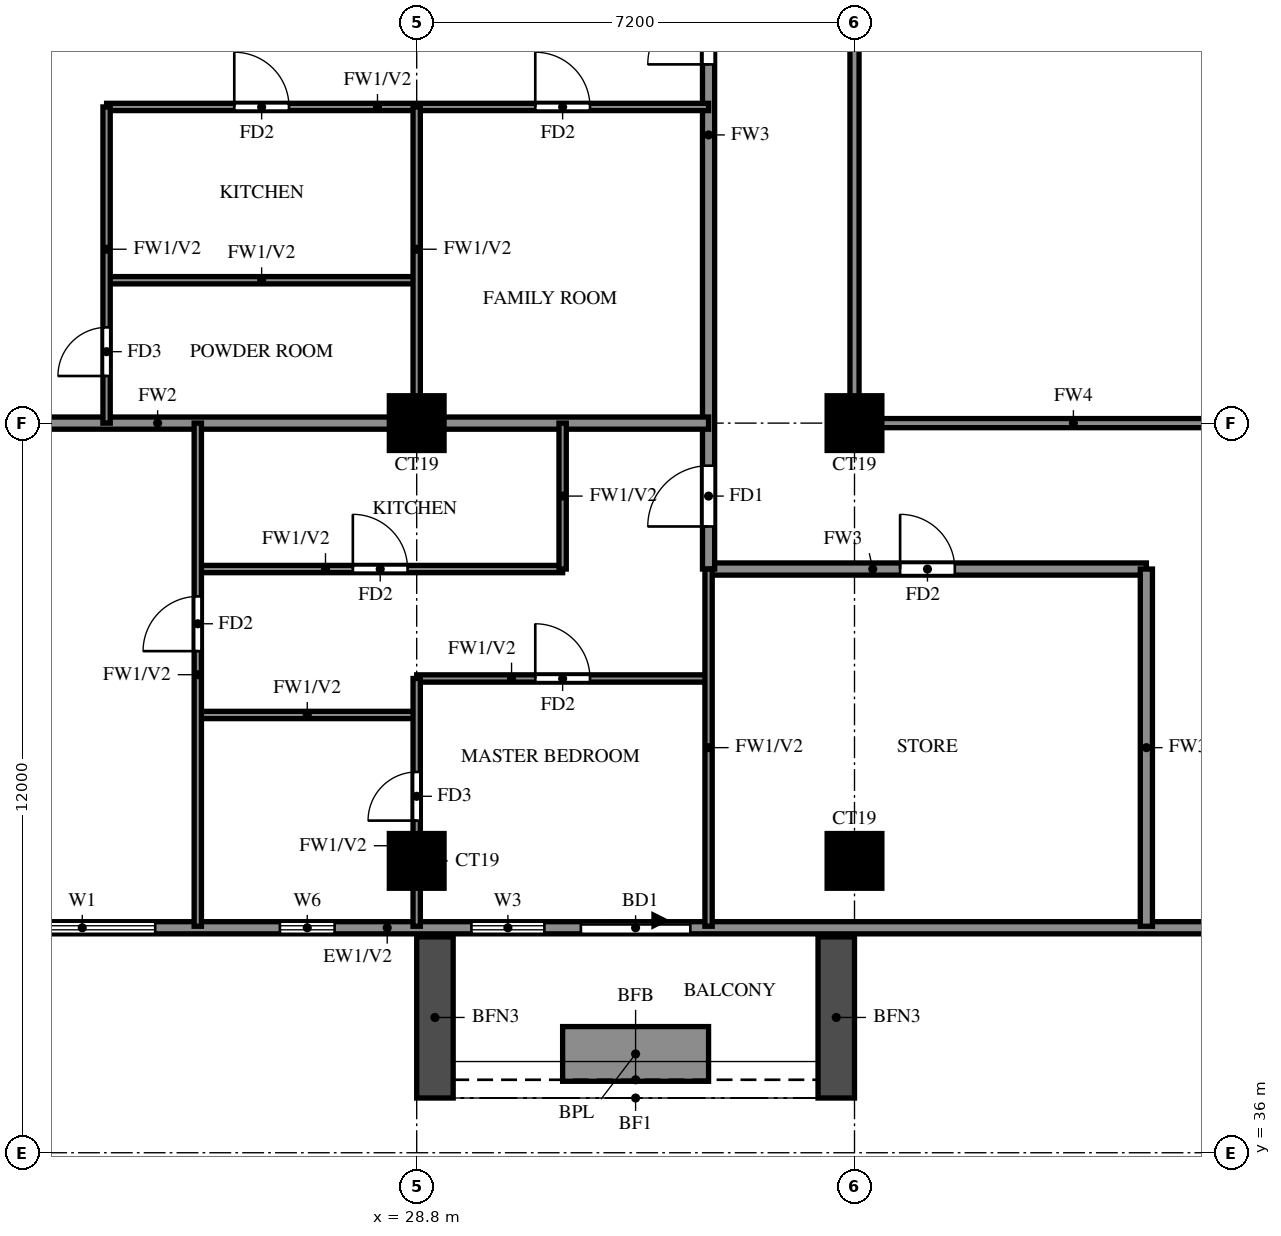
"""IFC4 building model, lengths in metres.
Left out: names, types, materials, properties, quantities, classifications, styles, units other than length and angle.
Written with IfcOpenShell. Run it as: python <this file> out.ifc"""

import sys

from ifc_helpers import new_model, si_unit, direction, frame, frame_2d, origin, origin_2d, place, context, subcontext, project, spatial, rectangle, extrude, source, transform, mapped, element, fill, save


model = new_model("IFC4")
c1 = context("Model", 3, precision=1e-05, world=origin(), true_north=direction((0.0, 1.0)))
c2 = subcontext(c1, "Body", "Model", "MODEL_VIEW")
j1 = project(units=[si_unit("LENGTHUNIT", "METRE"), si_unit("PLANEANGLEUNIT", "RADIAN")], contexts=[c1])
p1 = place(None, origin())
s1 = spatial("IfcSite", under=j1, at=p1, CompositionType="ELEMENT")
p2 = place(p1, origin())
s2 = spatial("IfcBuilding", under=s1, at=p2, CompositionType="ELEMENT")
p3 = place(p2, frame((0.0, 0.0, 199.0)))
s3 = spatial("IfcBuildingStorey", under=s2, at=p3, CompositionType="ELEMENT", Elevation=199.0)
m1 = source(origin(), c2, "Body", "SweptSolid", [
    extrude(rectangle(XDim=0.9, YDim=0.9, at=origin_2d()), origin(), (0.0, 0.0, 1.0), 3.2),
])
for number, where, z_axis, x_axis in (
    (1, (28.8, 40.8, 0.0), (0.0, 0.0, 1.0), (1.0, 0.0, 0.0)),
    (2, (36.0, 40.8, 0.0), (0.0, 0.0, 1.0), (1.0, 0.0, 0.0)),
    (3, (28.8, 48.0, 0.0), (0.0, 0.0, 1.0), (1.0, 0.0, 0.0)),
    (4, (36.0, 48.0, 0.0), (0.0, 0.0, 1.0), (1.0, 0.0, 0.0)),
):
    element("IfcColumn", number, at=place(p3, frame(where, z_axis=z_axis, x_axis=x_axis)), inside=s3, PredefinedType="COLUMN", context=c2, shape_type="MappedRepresentation", body=[
        mapped(m1, transform((0.0, 0.0, 0.0))),
    ])
p4 = place(p3, frame((18.2, 39.7, 0.0), z_axis=(0.0, 0.0, 1.0), x_axis=(1.0, 0.0, 0.0)))
e5 = element("IfcWall", 5, at=p4, inside=s3, PredefinedType="SOLIDWALL", context=c2, shape_type="SweptSolid", body=[
    extrude(rectangle(XDim=23.8, YDim=0.2, at=frame_2d((11.9, 0.0))), origin(), (0.0, 0.0, 1.0), 3.2),
])
p5 = place(p4, frame((13.3, 0.0, 0.0)))
e6 = element("IfcOpeningElement", 6, at=p5, cuts=e5, PredefinedType="OPENING", context=c2, shape_type="SweptSolid", body=[
    extrude(rectangle(XDim=1.8, YDim=2.4, at=frame_2d((0.9, 1.2))), frame((0.0, 0.11, 0.0), z_axis=(0.0, -1.0, 0.0), x_axis=(1.0, 0.0, 0.0)), (0.0, 0.0, 1.0), 0.22),
])
p6 = place(p4, frame((0.9, 0.0, 0.6)))
e7 = element("IfcOpeningElement", 7, at=p6, cuts=e5, PredefinedType="OPENING", context=c2, shape_type="SweptSolid", body=[
    extrude(rectangle(XDim=2.4, YDim=2.4, at=frame_2d((1.2, 1.2))), frame((0.0, 0.11, 0.0), z_axis=(0.0, -1.0, 0.0), x_axis=(1.0, 0.0, 0.0)), (0.0, 0.0, 1.0), 0.22),
])
p7 = place(p4, frame((3.9, 0.0, 0.6)))
e8 = element("IfcOpeningElement", 8, at=p7, cuts=e5, PredefinedType="OPENING", context=c2, shape_type="SweptSolid", body=[
    extrude(rectangle(XDim=2.4, YDim=2.4, at=frame_2d((1.2, 1.2))), frame((0.0, 0.11, 0.0), z_axis=(0.0, -1.0, 0.0), x_axis=(1.0, 0.0, 0.0)), (0.0, 0.0, 1.0), 0.22),
])
p8 = place(p4, frame((11.5, 0.0, 0.6)))
e9 = element("IfcOpeningElement", 9, at=p8, cuts=e5, PredefinedType="OPENING", context=c2, shape_type="SweptSolid", body=[
    extrude(rectangle(XDim=1.2, YDim=2.4, at=frame_2d((0.6, 1.2))), frame((0.0, 0.11, 0.0), z_axis=(0.0, -1.0, 0.0), x_axis=(1.0, 0.0, 0.0)), (0.0, 0.0, 1.0), 0.22),
])
p9 = place(p4, frame((8.35, 0.0, 1.5)))
e10 = element("IfcOpeningElement", 10, at=p9, cuts=e5, PredefinedType="OPENING", context=c2, shape_type="SweptSolid", body=[
    extrude(rectangle(XDim=0.9, YDim=0.9, at=frame_2d((0.45, 0.45))), frame((0.0, 0.11, 0.0), z_axis=(0.0, -1.0, 0.0), x_axis=(1.0, 0.0, 0.0)), (0.0, 0.0, 1.0), 0.22),
])
for number, where, z_axis, x_axis in (
    (11, (29.1, 39.55, 0.0), (0.0, 0.0, 1.0), (0.0, -1.0, 0.0)),
    (12, (35.7, 39.55, 0.0), (0.0, 0.0, 1.0), (0.0, -1.0, 0.0)),
):
    element("IfcWall", number, at=place(p3, frame(where, z_axis=z_axis, x_axis=x_axis)), inside=s3, PredefinedType="SOLIDWALL", context=c2, shape_type="SweptSolid", body=[
        extrude(rectangle(XDim=2.65, YDim=0.6, at=frame_2d((1.325, 0.0))), origin(), (0.0, 0.0, 1.0), 2.85),
    ])
p10 = place(p3, frame((31.2, 37.625, 0.0), z_axis=(0.0, 0.0, 1.0), x_axis=(1.0, 0.0, 0.0)))
e13 = element("IfcWall", 13, at=p10, inside=s3, PredefinedType="SOLIDWALL", context=c2, shape_type="SweptSolid", body=[
    extrude(rectangle(XDim=2.4, YDim=0.9, at=frame_2d((1.2, 0.0))), origin(), (0.0, 0.0, 1.0), 0.9),
])
p11 = place(p3, frame((33.6, 45.6, 0.0), z_axis=(0.0, 0.0, 1.0), x_axis=(1.0, 0.0, 0.0)))
e14 = element("IfcWall", 14, at=p11, inside=s3, PredefinedType="SOLIDWALL", context=c2, shape_type="SweptSolid", body=[
    extrude(rectangle(XDim=7.2, YDim=0.2, at=frame_2d((3.6, 0.0))), origin(), (0.0, 0.0, 1.0), 3.2),
])
p12 = place(p11, frame((3.15, 0.0, 0.0)))
e15 = element("IfcOpeningElement", 15, at=p12, cuts=e14, PredefinedType="OPENING", context=c2, shape_type="SweptSolid", body=[
    extrude(rectangle(XDim=0.9, YDim=2.1, at=frame_2d((0.45, 1.05))), frame((0.0, 0.11, 0.0), z_axis=(0.0, -1.0, 0.0), x_axis=(1.0, 0.0, 0.0)), (0.0, 0.0, 1.0), 0.22),
])
p13 = place(p3, frame((33.6, 45.6, 0.0), z_axis=(0.0, 0.0, 1.0), x_axis=(0.0, 1.0, 0.0)))
e16 = element("IfcWall", 16, at=p13, inside=s3, PredefinedType="SOLIDWALL", context=c2, shape_type="SweptSolid", body=[
    extrude(rectangle(XDim=16.8, YDim=0.2, at=frame_2d((8.4, 0.0))), origin(), (0.0, 0.0, 1.0), 3.2),
])
p14 = place(p13, frame((0.7, 0.0, 0.0)))
e17 = element("IfcOpeningElement", 17, at=p14, cuts=e16, PredefinedType="OPENING", context=c2, shape_type="SweptSolid", body=[
    extrude(rectangle(XDim=1.0, YDim=2.1, at=frame_2d((0.5, 1.05))), frame((0.0, 0.11, 0.0), z_axis=(0.0, -1.0, 0.0), x_axis=(1.0, 0.0, 0.0)), (0.0, 0.0, 1.0), 0.22),
])
p15 = place(p13, frame((8.3, 0.0, 0.0)))
e18 = element("IfcOpeningElement", 18, at=p15, cuts=e16, PredefinedType="OPENING", context=c2, shape_type="SweptSolid", body=[
    extrude(rectangle(XDim=1.0, YDim=2.1, at=frame_2d((0.5, 1.05))), frame((0.0, 0.11, 0.0), z_axis=(0.0, -1.0, 0.0), x_axis=(1.0, 0.0, 0.0)), (0.0, 0.0, 1.0), 0.22),
])
p16 = place(p13, frame((15.1, 0.0, 0.0)))
e19 = element("IfcOpeningElement", 19, at=p16, cuts=e16, PredefinedType="OPENING", context=c2, shape_type="SweptSolid", body=[
    extrude(rectangle(XDim=1.0, YDim=2.1, at=frame_2d((0.5, 1.05))), frame((0.0, 0.11, 0.0), z_axis=(0.0, -1.0, 0.0), x_axis=(1.0, 0.0, 0.0)), (0.0, 0.0, 1.0), 0.22),
])
p17 = place(p3, frame((40.8, 39.725, 0.0), z_axis=(0.0, 0.0, 1.0), x_axis=(0.0, 1.0, 0.0)))
e20 = element("IfcWall", 20, at=p17, inside=s3, PredefinedType="SOLIDWALL", context=c2, shape_type="SweptSolid", body=[
    extrude(rectangle(XDim=5.875, YDim=0.2, at=frame_2d((2.938, 0.0))), origin(), (0.0, 0.0, 1.0), 3.2),
])
p18 = place(p3, frame((14.525, 48.0, 0.0), z_axis=(0.0, 0.0, 1.0), x_axis=(1.0, 0.0, 0.0)))
e21 = element("IfcWall", 21, at=p18, inside=s3, PredefinedType="SOLIDWALL", context=c2, shape_type="SweptSolid", body=[
    extrude(rectangle(XDim=19.075, YDim=0.2, at=frame_2d((9.538, 0.0))), origin(), (0.0, 0.0, 1.0), 3.2),
])
p19 = place(p3, frame((25.2, 43.2, 0.0), z_axis=(0.0, 0.0, 1.0), x_axis=(1.0, 0.0, 0.0)))
e22 = element("IfcWall", 22, at=p19, inside=s3, PredefinedType="PARTITIONING", context=c2, shape_type="SweptSolid", body=[
    extrude(rectangle(XDim=3.6, YDim=0.12, at=frame_2d((1.8, 0.0))), origin(), (0.0, 0.0, 1.0), 3.2),
])
p20 = place(p3, frame((28.8, 43.8, 0.0), z_axis=(0.0, 0.0, 1.0), x_axis=(1.0, 0.0, 0.0)))
e23 = element("IfcWall", 23, at=p20, inside=s3, PredefinedType="PARTITIONING", context=c2, shape_type="SweptSolid", body=[
    extrude(rectangle(XDim=4.8, YDim=0.12, at=frame_2d((2.4, 0.0))), origin(), (0.0, 0.0, 1.0), 3.2),
])
p21 = place(p20, frame((1.95, 0.0, 0.0)))
e24 = element("IfcOpeningElement", 24, at=p21, cuts=e23, PredefinedType="OPENING", context=c2, shape_type="SweptSolid", body=[
    extrude(rectangle(XDim=0.9, YDim=2.1, at=frame_2d((0.45, 1.05))), frame((0.0, 0.07, 0.0), z_axis=(0.0, -1.0, 0.0), x_axis=(1.0, 0.0, 0.0)), (0.0, 0.0, 1.0), 0.14),
])
p22 = place(p3, frame((25.2, 45.6, 0.0), z_axis=(0.0, 0.0, 1.0), x_axis=(1.0, 0.0, 0.0)))
e25 = element("IfcWall", 25, at=p22, inside=s3, PredefinedType="PARTITIONING", context=c2, shape_type="SweptSolid", body=[
    extrude(rectangle(XDim=6.0, YDim=0.12, at=frame_2d((3.0, 0.0))), origin(), (0.0, 0.0, 1.0), 3.2),
])
p23 = place(p22, frame((2.55, 0.0, 0.0)))
e26 = element("IfcOpeningElement", 26, at=p23, cuts=e25, PredefinedType="OPENING", context=c2, shape_type="SweptSolid", body=[
    extrude(rectangle(XDim=0.9, YDim=2.1, at=frame_2d((0.45, 1.05))), frame((0.0, 0.07, 0.0), z_axis=(0.0, -1.0, 0.0), x_axis=(1.0, 0.0, 0.0)), (0.0, 0.0, 1.0), 0.14),
])
p24 = place(p3, frame((23.7, 50.35, 0.0), z_axis=(0.0, 0.0, 1.0), x_axis=(1.0, 0.0, 0.0)))
e27 = element("IfcWall", 27, at=p24, inside=s3, PredefinedType="PARTITIONING", context=c2, shape_type="SweptSolid", body=[
    extrude(rectangle(XDim=5.1, YDim=0.12, at=frame_2d((2.55, 0.0))), origin(), (0.0, 0.0, 1.0), 3.2),
])
p25 = place(p3, frame((23.7, 53.2, 0.0), z_axis=(0.0, 0.0, 1.0), x_axis=(1.0, 0.0, 0.0)))
e28 = element("IfcWall", 28, at=p25, inside=s3, PredefinedType="PARTITIONING", context=c2, shape_type="SweptSolid", body=[
    extrude(rectangle(XDim=9.9, YDim=0.12, at=frame_2d((4.95, 0.0))), origin(), (0.0, 0.0, 1.0), 3.2),
])
p26 = place(p25, frame((2.1, 0.0, 0.0)))
e29 = element("IfcOpeningElement", 29, at=p26, cuts=e28, PredefinedType="OPENING", context=c2, shape_type="SweptSolid", body=[
    extrude(rectangle(XDim=0.9, YDim=2.1, at=frame_2d((0.45, 1.05))), frame((0.0, 0.07, 0.0), z_axis=(0.0, -1.0, 0.0), x_axis=(1.0, 0.0, 0.0)), (0.0, 0.0, 1.0), 0.14),
])
p27 = place(p25, frame((7.05, 0.0, 0.0)))
e30 = element("IfcOpeningElement", 30, at=p27, cuts=e28, PredefinedType="OPENING", context=c2, shape_type="SweptSolid", body=[
    extrude(rectangle(XDim=0.9, YDim=2.1, at=frame_2d((0.45, 1.05))), frame((0.0, 0.07, 0.0), z_axis=(0.0, -1.0, 0.0), x_axis=(1.0, 0.0, 0.0)), (0.0, 0.0, 1.0), 0.14),
])
p28 = place(p3, frame((23.7, 48.0, 0.0), z_axis=(0.0, 0.0, 1.0), x_axis=(0.0, 1.0, 0.0)))
e31 = element("IfcWall", 31, at=p28, inside=s3, PredefinedType="PARTITIONING", context=c2, shape_type="SweptSolid", body=[
    extrude(rectangle(XDim=5.2, YDim=0.12, at=frame_2d((2.6, 0.0))), origin(), (0.0, 0.0, 1.0), 3.2),
])
p29 = place(p28, frame((0.775, 0.0, 0.0)))
e32 = element("IfcOpeningElement", 32, at=p29, cuts=e31, PredefinedType="OPENING", context=c2, shape_type="SweptSolid", body=[
    extrude(rectangle(XDim=0.8, YDim=2.1, at=frame_2d((0.4, 1.05))), frame((0.0, 0.07, 0.0), z_axis=(0.0, -1.0, 0.0), x_axis=(1.0, 0.0, 0.0)), (0.0, 0.0, 1.0), 0.14),
])
p30 = place(p3, frame((25.2, 39.725, 0.0), z_axis=(0.0, 0.0, 1.0), x_axis=(0.0, 1.0, 0.0)))
e33 = element("IfcWall", 33, at=p30, inside=s3, PredefinedType="PARTITIONING", context=c2, shape_type="SweptSolid", body=[
    extrude(rectangle(XDim=8.275, YDim=0.12, at=frame_2d((4.137, 0.0))), origin(), (0.0, 0.0, 1.0), 3.2),
])
p31 = place(p30, frame((4.525, 0.0, 0.0)))
e34 = element("IfcOpeningElement", 34, at=p31, cuts=e33, PredefinedType="OPENING", context=c2, shape_type="SweptSolid", body=[
    extrude(rectangle(XDim=0.9, YDim=2.1, at=frame_2d((0.45, 1.05))), frame((0.0, 0.07, 0.0), z_axis=(0.0, -1.0, 0.0), x_axis=(1.0, 0.0, 0.0)), (0.0, 0.0, 1.0), 0.14),
])
p32 = place(p3, frame((28.8, 39.725, 0.0), z_axis=(0.0, 0.0, 1.0), x_axis=(0.0, 1.0, 0.0)))
e35 = element("IfcWall", 35, at=p32, inside=s3, PredefinedType="PARTITIONING", context=c2, shape_type="SweptSolid", body=[
    extrude(rectangle(XDim=4.075, YDim=0.12, at=frame_2d((2.038, 0.0))), origin(), (0.0, 0.0, 1.0), 3.2),
])
p33 = place(p32, frame((1.738, 0.0, 0.0)))
e36 = element("IfcOpeningElement", 36, at=p33, cuts=e35, PredefinedType="OPENING", context=c2, shape_type="SweptSolid", body=[
    extrude(rectangle(XDim=0.8, YDim=2.1, at=frame_2d((0.4, 1.05))), frame((0.0, 0.07, 0.0), z_axis=(0.0, -1.0, 0.0), x_axis=(1.0, 0.0, 0.0)), (0.0, 0.0, 1.0), 0.14),
])
p34 = place(p3, frame((28.8, 48.0, 0.0), z_axis=(0.0, 0.0, 1.0), x_axis=(0.0, 1.0, 0.0)))
e37 = element("IfcWall", 37, at=p34, inside=s3, PredefinedType="PARTITIONING", context=c2, shape_type="SweptSolid", body=[
    extrude(rectangle(XDim=5.2, YDim=0.12, at=frame_2d((2.6, 0.0))), origin(), (0.0, 0.0, 1.0), 3.2),
])
p35 = place(p3, frame((31.2, 45.6, 0.0), z_axis=(0.0, 0.0, 1.0), x_axis=(0.0, 1.0, 0.0)))
e38 = element("IfcWall", 38, at=p35, inside=s3, PredefinedType="PARTITIONING", context=c2, shape_type="SweptSolid", body=[
    extrude(rectangle(XDim=2.4, YDim=0.12, at=frame_2d((1.2, 0.0))), origin(), (0.0, 0.0, 1.0), 3.2),
])
p36 = place(p3, frame((33.6, 39.725, 0.0), z_axis=(0.0, 0.0, 1.0), x_axis=(0.0, 1.0, 0.0)))
e39 = element("IfcWall", 39, at=p36, inside=s3, PredefinedType="PARTITIONING", context=c2, shape_type="SweptSolid", body=[
    extrude(rectangle(XDim=5.875, YDim=0.12, at=frame_2d((2.938, 0.0))), origin(), (0.0, 0.0, 1.0), 3.2),
])
p37 = place(p3, frame((36.0, 48.0, 0.0), z_axis=(0.0, 0.0, 1.0), x_axis=(1.0, 0.0, 0.0)))
e40 = element("IfcWall", 40, at=p37, inside=s3, PredefinedType="SOLIDWALL", context=c2, shape_type="SweptSolid", body=[
    extrude(rectangle(XDim=7.2, YDim=0.15, at=frame_2d((3.6, 0.0))), origin(), (0.0, 0.0, 1.0), 2.3),
])
p38 = place(p3, frame((36.0, 48.0, 0.0), z_axis=(0.0, 0.0, 1.0), x_axis=(0.0, 1.0, 0.0)))
e41 = element("IfcWall", 41, at=p38, inside=s3, PredefinedType="SOLIDWALL", context=c2, shape_type="SweptSolid", body=[
    extrude(rectangle(XDim=14.4, YDim=0.15, at=frame_2d((7.2, 0.0))), origin(), (0.0, 0.0, 1.0), 2.3),
])
p39 = place(p5, origin())
e42 = element("IfcDoor", 42, at=p39, inside=s3, OperationType="DOUBLE_DOOR_SLIDING", PredefinedType="DOOR", context=c2, shape_type="SweptSolid", body=[
    extrude(rectangle(XDim=1.8, YDim=2.4, at=frame_2d((0.9, 1.2))), frame((0.0, 0.025, 0.0), z_axis=(0.0, -1.0, 0.0), x_axis=(1.0, 0.0, 0.0)), (0.0, 0.0, 1.0), 0.05),
])
fill(e6, e42)
p40 = place(p7, origin())
e43 = element("IfcWindow", 43, at=p40, inside=s3, PartitioningType="DOUBLE_PANEL_VERTICAL", PredefinedType="WINDOW", context=c2, shape_type="SweptSolid", body=[
    extrude(rectangle(XDim=2.4, YDim=2.4, at=frame_2d((1.2, 1.2))), frame((0.0, 0.03, 0.0), z_axis=(0.0, -1.0, 0.0), x_axis=(1.0, 0.0, 0.0)), (0.0, 0.0, 1.0), 0.06),
])
fill(e8, e43)
p41 = place(p8, origin())
e44 = element("IfcWindow", 44, at=p41, inside=s3, PartitioningType="SINGLE_PANEL", PredefinedType="WINDOW", context=c2, shape_type="SweptSolid", body=[
    extrude(rectangle(XDim=1.2, YDim=2.4, at=frame_2d((0.6, 1.2))), frame((0.0, 0.03, 0.0), z_axis=(0.0, -1.0, 0.0), x_axis=(1.0, 0.0, 0.0)), (0.0, 0.0, 1.0), 0.06),
])
fill(e9, e44)
p42 = place(p9, origin())
e45 = element("IfcWindow", 45, at=p42, inside=s3, PartitioningType="SINGLE_PANEL", PredefinedType="WINDOW", context=c2, shape_type="SweptSolid", body=[
    extrude(rectangle(XDim=0.9, YDim=0.9, at=frame_2d((0.45, 0.45))), frame((0.0, 0.03, 0.0), z_axis=(0.0, -1.0, 0.0), x_axis=(1.0, 0.0, 0.0)), (0.0, 0.0, 1.0), 0.06),
])
fill(e10, e45)
p43 = place(p14, origin())
e46 = element("IfcDoor", 46, at=p43, inside=s3, OperationType="SINGLE_SWING_LEFT", PredefinedType="DOOR", context=c2, shape_type="SweptSolid", body=[
    extrude(rectangle(XDim=1.0, YDim=2.1, at=frame_2d((0.5, 1.05))), frame((0.0, 0.025, 0.0), z_axis=(0.0, -1.0, 0.0), x_axis=(1.0, 0.0, 0.0)), (0.0, 0.0, 1.0), 0.05),
])
fill(e17, e46)
p44 = place(p31, origin())
e47 = element("IfcDoor", 47, at=p44, inside=s3, OperationType="SINGLE_SWING_RIGHT", PredefinedType="DOOR", context=c2, shape_type="SweptSolid", body=[
    extrude(rectangle(XDim=0.9, YDim=2.1, at=frame_2d((0.45, 1.05))), frame((0.0, 0.025, 0.0), z_axis=(0.0, -1.0, 0.0), x_axis=(1.0, 0.0, 0.0)), (0.0, 0.0, 1.0), 0.05),
])
fill(e34, e47)
p45 = place(p21, origin())
e48 = element("IfcDoor", 48, at=p45, inside=s3, OperationType="SINGLE_SWING_LEFT", PredefinedType="DOOR", context=c2, shape_type="SweptSolid", body=[
    extrude(rectangle(XDim=0.9, YDim=2.1, at=frame_2d((0.45, 1.05))), frame((0.0, 0.025, 0.0), z_axis=(0.0, -1.0, 0.0), x_axis=(1.0, 0.0, 0.0)), (0.0, 0.0, 1.0), 0.05),
])
fill(e24, e48)
p46 = place(p33, origin())
e49 = element("IfcDoor", 49, at=p46, inside=s3, OperationType="SINGLE_SWING_RIGHT", PredefinedType="DOOR", context=c2, shape_type="SweptSolid", body=[
    extrude(rectangle(XDim=0.8, YDim=2.1, at=frame_2d((0.4, 1.05))), frame((0.0, 0.025, 0.0), z_axis=(0.0, -1.0, 0.0), x_axis=(1.0, 0.0, 0.0)), (0.0, 0.0, 1.0), 0.05),
])
fill(e36, e49)
p47 = place(p23, origin())
e50 = element("IfcDoor", 50, at=p47, inside=s3, OperationType="SINGLE_SWING_RIGHT", PredefinedType="DOOR", context=c2, shape_type="SweptSolid", body=[
    extrude(rectangle(XDim=0.9, YDim=2.1, at=frame_2d((0.45, 1.05))), frame((0.0, 0.025, 0.0), z_axis=(0.0, -1.0, 0.0), x_axis=(1.0, 0.0, 0.0)), (0.0, 0.0, 1.0), 0.05),
])
fill(e26, e50)
p48 = place(p12, origin())
e51 = element("IfcDoor", 51, at=p48, inside=s3, OperationType="SINGLE_SWING_LEFT", PredefinedType="DOOR", context=c2, shape_type="SweptSolid", body=[
    extrude(rectangle(XDim=0.9, YDim=2.1, at=frame_2d((0.45, 1.05))), frame((0.0, 0.025, 0.0), z_axis=(0.0, -1.0, 0.0), x_axis=(1.0, 0.0, 0.0)), (0.0, 0.0, 1.0), 0.05),
])
fill(e15, e51)
p49 = place(p15, origin())
e52 = element("IfcDoor", 52, at=p49, inside=s3, OperationType="SINGLE_SWING_LEFT", PredefinedType="DOOR", context=c2, shape_type="SweptSolid", body=[
    extrude(rectangle(XDim=1.0, YDim=2.1, at=frame_2d((0.5, 1.05))), frame((0.0, 0.025, 0.0), z_axis=(0.0, -1.0, 0.0), x_axis=(1.0, 0.0, 0.0)), (0.0, 0.0, 1.0), 0.05),
])
fill(e18, e52)
p50 = place(p29, origin())
e53 = element("IfcDoor", 53, at=p50, inside=s3, OperationType="SINGLE_SWING_RIGHT", PredefinedType="DOOR", context=c2, shape_type="SweptSolid", body=[
    extrude(rectangle(XDim=0.8, YDim=2.1, at=frame_2d((0.4, 1.05))), frame((0.0, 0.025, 0.0), z_axis=(0.0, -1.0, 0.0), x_axis=(1.0, 0.0, 0.0)), (0.0, 0.0, 1.0), 0.05),
])
fill(e32, e53)
p51 = place(p26, origin())
e54 = element("IfcDoor", 54, at=p51, inside=s3, OperationType="SINGLE_SWING_LEFT", PredefinedType="DOOR", context=c2, shape_type="SweptSolid", body=[
    extrude(rectangle(XDim=0.9, YDim=2.1, at=frame_2d((0.45, 1.05))), frame((0.0, 0.025, 0.0), z_axis=(0.0, -1.0, 0.0), x_axis=(1.0, 0.0, 0.0)), (0.0, 0.0, 1.0), 0.05),
])
fill(e29, e54)
p52 = place(p27, origin())
e55 = element("IfcDoor", 55, at=p52, inside=s3, OperationType="SINGLE_SWING_RIGHT", PredefinedType="DOOR", context=c2, shape_type="SweptSolid", body=[
    extrude(rectangle(XDim=0.9, YDim=2.1, at=frame_2d((0.45, 1.05))), frame((0.0, 0.025, 0.0), z_axis=(0.0, -1.0, 0.0), x_axis=(1.0, 0.0, 0.0)), (0.0, 0.0, 1.0), 0.05),
])
fill(e30, e55)
save(model, sys.argv[1])
